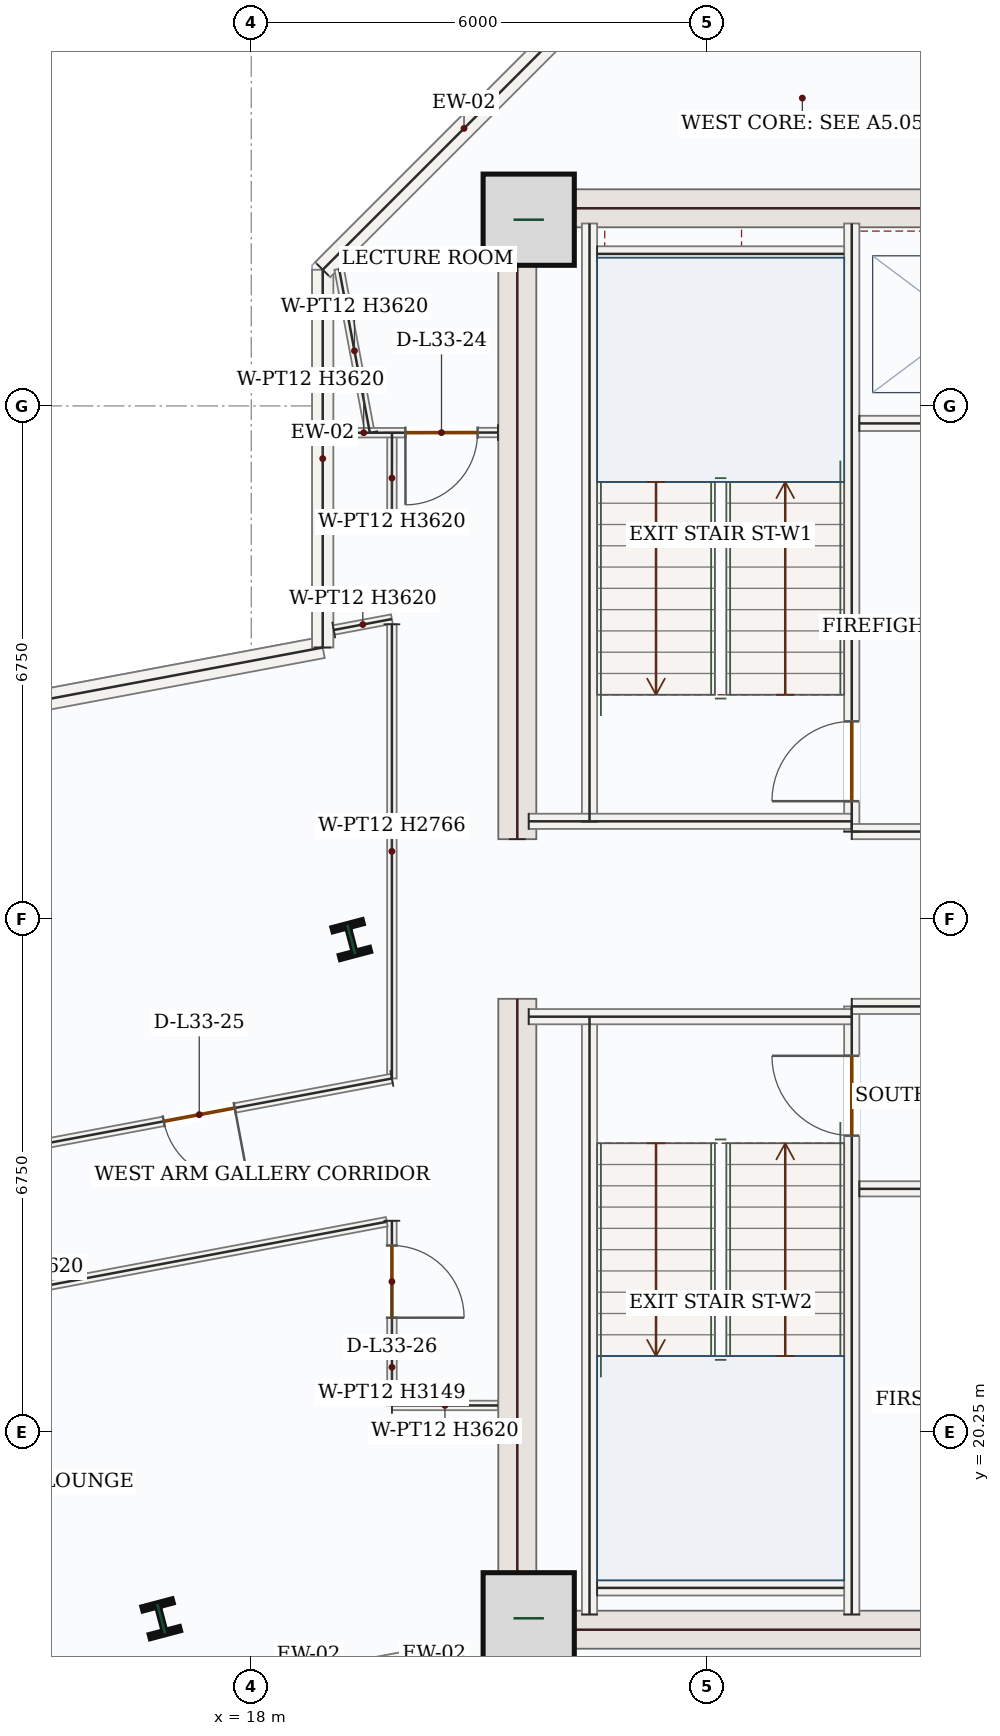
"""IFC4 building model, lengths in metres.
Left out: names, types, materials, properties, quantities, classifications, styles, units other than length and angle.
Written with IfcOpenShell. Run it as: python <this file> out.ifc"""

import sys

from ifc_helpers import new_model, si_unit, direction, frame, frame_2d, origin, origin_2d, place, context, subcontext, project, spatial, rectangle, i_section, extrude, source, transform, mapped, element, fill, save


model = new_model("IFC4")
c1 = context("Model", 3, precision=1e-05, world=origin(), true_north=direction((0.0, 1.0)))
c2 = subcontext(c1, "Body", "Model", "MODEL_VIEW")
j1 = project(units=[si_unit("LENGTHUNIT", "METRE"), si_unit("PLANEANGLEUNIT", "RADIAN")], contexts=[c1])
p1 = place(None, origin())
s1 = spatial("IfcSite", under=j1, at=p1, CompositionType="ELEMENT")
p2 = place(p1, origin())
s2 = spatial("IfcBuilding", under=s1, at=p2, CompositionType="ELEMENT")
p3 = place(p2, frame((0.0, 0.0, 147.3)))
s3 = spatial("IfcBuildingStorey", under=s2, at=p3, CompositionType="ELEMENT", Elevation=147.3)
m1 = source(origin(), c2, "Body", "SweptSolid", [
    extrude(rectangle(XDim=8.55, YDim=0.5, at=frame_2d((4.275, 0.0))), origin(), (0.0, 0.0, 1.0), 3.62),
])
for number, where, z_axis, x_axis in (
    (1, (21.5, 17.4, 0.0), (0.0, 0.0, 1.0), (0.0, 1.0, 0.0)),
    (2, (21.5, 28.05, 0.0), (0.0, 0.0, 1.0), (0.0, 1.0, 0.0)),
):
    element("IfcWall", number, at=place(p3, frame(where, z_axis=z_axis, x_axis=x_axis)), inside=s3, PredefinedType="SHEAR", context=c2, shape_type="MappedRepresentation", body=[
        mapped(m1, transform((0.0, 0.0, 0.0), x_axis=(1.0, 0.0, 0.0), y_axis=(0.0, 1.0, 0.0), z_axis=(0.0, 0.0, 1.0), scale=1.0)),
    ])
m2 = source(origin(), c2, "Body", "SweptSolid", [
    extrude(rectangle(XDim=7.0, YDim=0.5, at=frame_2d((3.5, 0.0))), origin(), (0.0, 0.0, 1.0), 3.62),
])
for number, where, z_axis, x_axis in (
    (3, (21.75, 17.65, 0.0), (0.0, 0.0, 1.0), (1.0, 0.0, 0.0)),
    (4, (21.75, 36.35, 0.0), (0.0, 0.0, 1.0), (1.0, 0.0, 0.0)),
):
    element("IfcWall", number, at=place(p3, frame(where, z_axis=z_axis, x_axis=x_axis)), inside=s3, PredefinedType="SHEAR", context=c2, shape_type="MappedRepresentation", body=[
        mapped(m2, transform((0.0, 0.0, 0.0), x_axis=(1.0, 0.0, 0.0), y_axis=(0.0, 1.0, 0.0), z_axis=(0.0, 0.0, 1.0), scale=1.0)),
    ])
m3 = source(origin(), c2, "Body", "SweptSolid", [
    extrude(rectangle(XDim=1.2, YDim=1.2, at=origin_2d()), origin(), (0.0, 0.0, 1.0), 3.9),
])
for number, where, z_axis, x_axis in (
    (5, (21.65, 17.8, 0.0), (0.0, 0.0, 1.0), (1.0, 0.0, 0.0)),
    (6, (21.65, 36.2, 0.0), (0.0, 0.0, 1.0), (1.0, 0.0, 0.0)),
):
    element("IfcColumn", number, at=place(p3, frame(where, z_axis=z_axis, x_axis=x_axis)), inside=s3, PredefinedType="COLUMN", context=c2, shape_type="MappedRepresentation", body=[
        mapped(m3, transform((0.0, 0.0, 0.0), x_axis=(1.0, 0.0, 0.0), y_axis=(0.0, 1.0, 0.0), z_axis=(0.0, 0.0, 1.0), scale=1.0)),
    ])
m4 = source(origin(), c2, "Body", "SweptSolid", [
    extrude(i_section(OverallWidth=0.412, OverallDepth=0.435, WebThickness=0.036, FlangeThickness=0.057, FilletRadius=0.018, at=origin_2d()), origin(), (0.0, 0.0, 1.0), 3.9),
])
for number, where, z_axis, x_axis in (
    (7, (19.316, 26.729, 0.0), (0.0, 0.0, 1.0), (0.967, 0.255, 0.0)),
    (8, (16.815, 17.794, 0.0), (0.0, 0.0, 1.0), (0.967, 0.255, 0.0)),
):
    element("IfcColumn", number, at=place(p3, frame(where, z_axis=z_axis, x_axis=x_axis)), inside=s3, PredefinedType="COLUMN", context=c2, shape_type="MappedRepresentation", body=[
        mapped(m4, transform((0.0, 0.0, 0.0), x_axis=(1.0, 0.0, 0.0), y_axis=(0.0, 1.0, 0.0), z_axis=(0.0, 0.0, 1.0), scale=1.0)),
    ])
p4 = place(p3, frame((22.658, 14.74, 0.0), z_axis=(0.0, 0.0, 1.0), x_axis=(-0.707106781187, 0.707106781187, 0.0)))
e9 = element("IfcWall", 9, at=p4, inside=s3, PredefinedType="SOLIDWALL", context=c2, shape_type="SweptSolid", body=[
    extrude(rectangle(XDim=3.544, YDim=0.28, at=frame_2d((1.772, 0.0))), origin(), (0.0, 0.0, 1.0), 3.62),
])
p5 = place(p4, frame((0.872, 0.0, 0.85)))
e10 = element("IfcOpeningElement", 10, at=p5, cuts=e9, PredefinedType="OPENING", context=c2, shape_type="SweptSolid", body=[
    extrude(rectangle(XDim=1.8, YDim=1.75, at=frame_2d((0.9, 0.875))), frame((0.0, 0.15, 0.0), z_axis=(0.0, -1.0, 0.0), x_axis=(1.0, 0.0, 0.0)), (0.0, 0.0, 1.0), 0.3),
])
p6 = place(p3, frame((20.152, 17.246, 0.0), z_axis=(0.0, 0.0, 1.0), x_axis=(-0.982809278234, -0.18462373254, 0.0)))
e11 = element("IfcWall", 11, at=p6, inside=s3, PredefinedType="SOLIDWALL", context=c2, shape_type="SweptSolid", body=[
    extrude(rectangle(XDim=7.783, YDim=0.28, at=frame_2d((3.892, 0.0))), origin(), (0.0, 0.0, 1.0), 3.62),
])
p7 = place(p6, frame((2.992, 0.0, 0.85)))
e12 = element("IfcOpeningElement", 12, at=p7, cuts=e11, PredefinedType="OPENING", context=c2, shape_type="SweptSolid", body=[
    extrude(rectangle(XDim=1.8, YDim=1.75, at=frame_2d((0.9, 0.875))), frame((0.0, 0.15, 0.0), z_axis=(0.0, -1.0, 0.0), x_axis=(1.0, 0.0, 0.0)), (0.0, 0.0, 1.0), 0.3),
])
m5 = source(origin(), c2, "Body", "SweptSolid", [
    extrude(rectangle(XDim=9.052, YDim=0.28, at=frame_2d((4.526, 0.0))), origin(), (0.0, 0.0, 1.0), 3.62),
])
p8 = place(p3, frame((10.043, 28.9, 0.0), z_axis=(0.0, 0.0, 1.0), x_axis=(0.982808012228, 0.184630471755, 0.0)))
e13 = element("IfcWall", 13, at=p8, inside=s3, PredefinedType="SOLIDWALL", context=c2, shape_type="MappedRepresentation", body=[
    mapped(m5, transform((0.0, 0.0, 0.0), x_axis=(1.0, 0.0, 0.0), y_axis=(0.0, 1.0, 0.0), z_axis=(0.0, 0.0, 1.0), scale=1.0)),
])
m6 = source(origin(), c2, "Body", "SweptSolid", [
    extrude(rectangle(XDim=4.97, YDim=0.28, at=frame_2d((2.485, 0.0))), origin(), (0.0, 0.0, 1.0), 3.62),
])
p9 = place(p3, frame((18.94, 30.572, 0.0), z_axis=(0.0, 0.0, 1.0), x_axis=(0.0, 1.0, 0.0)))
e14 = element("IfcWall", 14, at=p9, inside=s3, PredefinedType="SOLIDWALL", context=c2, shape_type="MappedRepresentation", body=[
    mapped(m6, transform((0.0, 0.0, 0.0), x_axis=(1.0, 0.0, 0.0), y_axis=(0.0, 1.0, 0.0), z_axis=(0.0, 0.0, 1.0), scale=1.0)),
])
m7 = source(origin(), c2, "Body", "SweptSolid", [
    extrude(rectangle(XDim=5.258, YDim=0.28, at=frame_2d((2.629, 0.0))), origin(), (0.0, 0.0, 1.0), 3.62),
])
p10 = place(p3, frame((18.94, 35.542, 0.0), z_axis=(0.0, 0.0, 1.0), x_axis=(0.707106781187, 0.707106781187, 0.0)))
e15 = element("IfcWall", 15, at=p10, inside=s3, PredefinedType="SOLIDWALL", context=c2, shape_type="MappedRepresentation", body=[
    mapped(m7, transform((0.0, 0.0, 0.0), x_axis=(1.0, 0.0, 0.0), y_axis=(0.0, 1.0, 0.0), z_axis=(0.0, 0.0, 1.0), scale=1.0)),
])
m8 = source(origin(), c2, "Body", "SweptSolid", [
    extrude(rectangle(XDim=7.87, YDim=0.2, at=frame_2d((3.935, 0.0))), origin(), (0.0, 0.0, 1.0), 3.62),
])
for number, where, z_axis, x_axis in (
    (16, (22.45, 17.85, 0.0), (0.0, 0.0, 1.0), (0.0, 1.0, 0.0)),
    (17, (22.45, 28.28, 0.0), (0.0, 0.0, 1.0), (0.0, 1.0, 0.0)),
):
    element("IfcWall", number, at=place(p3, frame(where, z_axis=z_axis, x_axis=x_axis)), inside=s3, PredefinedType="SOLIDWALL", context=c2, shape_type="MappedRepresentation", body=[
        mapped(m8, transform((0.0, 0.0, 0.0), x_axis=(1.0, 0.0, 0.0), y_axis=(0.0, 1.0, 0.0), z_axis=(0.0, 0.0, 1.0), scale=1.0)),
    ])
p11 = place(p3, frame((25.9, 17.85, 0.0), z_axis=(0.0, 0.0, 1.0), x_axis=(0.0, 1.0, 0.0)))
e18 = element("IfcWall", 18, at=p11, inside=s3, PredefinedType="SOLIDWALL", context=c2, shape_type="SweptSolid", body=[
    extrude(rectangle(XDim=8.0, YDim=0.2, at=frame_2d((4.0, 0.0))), origin(), (0.0, 0.0, 1.0), 3.62),
])
p12 = place(p11, frame((6.3, 0.0, 0.0)))
e19 = element("IfcOpeningElement", 19, at=p12, cuts=e18, PredefinedType="OPENING", context=c2, shape_type="SweptSolid", body=[
    extrude(rectangle(XDim=1.05, YDim=2.15, at=frame_2d((0.525, 1.075))), frame((0.0, 0.11, 0.0), z_axis=(0.0, -1.0, 0.0), x_axis=(1.0, 0.0, 0.0)), (0.0, 0.0, 1.0), 0.22),
])
p13 = place(p3, frame((25.9, 28.15, 0.0), z_axis=(0.0, 0.0, 1.0), x_axis=(0.0, 1.0, 0.0)))
e20 = element("IfcWall", 20, at=p13, inside=s3, PredefinedType="SOLIDWALL", context=c2, shape_type="SweptSolid", body=[
    extrude(rectangle(XDim=8.0, YDim=0.2, at=frame_2d((4.0, 0.0))), origin(), (0.0, 0.0, 1.0), 3.62),
])
p14 = place(p13, frame((0.4, 0.0, 0.0)))
e21 = element("IfcOpeningElement", 21, at=p14, cuts=e20, PredefinedType="OPENING", context=c2, shape_type="SweptSolid", body=[
    extrude(rectangle(XDim=1.05, YDim=2.15, at=frame_2d((0.525, 1.075))), frame((0.0, 0.11, 0.0), z_axis=(0.0, -1.0, 0.0), x_axis=(1.0, 0.0, 0.0)), (0.0, 0.0, 1.0), 0.22),
])
m9 = source(origin(), c2, "Body", "SweptSolid", [
    extrude(rectangle(XDim=4.25, YDim=0.2, at=frame_2d((2.125, 0.0))), origin(), (0.0, 0.0, 1.0), 3.62),
])
p15 = place(p3, frame((21.65, 25.715, 0.0), z_axis=(0.0, 0.0, 1.0), x_axis=(1.0, 0.0, 0.0)))
e22 = element("IfcWall", 22, at=p15, inside=s3, PredefinedType="SOLIDWALL", context=c2, shape_type="MappedRepresentation", body=[
    mapped(m9, transform((0.0, 0.0, 0.0), x_axis=(1.0, 0.0, 0.0), y_axis=(0.0, 1.0, 0.0), z_axis=(0.0, 0.0, 1.0), scale=1.0)),
])
m10 = source(origin(), c2, "Body", "SweptSolid", [
    extrude(rectangle(XDim=3.0, YDim=0.2, at=frame_2d((1.5, 0.0))), origin(), (0.0, 0.0, 1.0), 3.62),
])
p16 = place(p3, frame((25.9, 25.85, 0.0), z_axis=(0.0, 0.0, 1.0), x_axis=(1.0, 0.0, 0.0)))
e23 = element("IfcWall", 23, at=p16, inside=s3, PredefinedType="SOLIDWALL", context=c2, shape_type="MappedRepresentation", body=[
    mapped(m10, transform((0.0, 0.0, 0.0), x_axis=(1.0, 0.0, 0.0), y_axis=(0.0, 1.0, 0.0), z_axis=(0.0, 0.0, 1.0), scale=1.0)),
])
p17 = place(p3, frame((21.65, 28.285, 0.0), z_axis=(0.0, 0.0, 1.0), x_axis=(1.0, 0.0, 0.0)))
e24 = element("IfcWall", 24, at=p17, inside=s3, PredefinedType="SOLIDWALL", context=c2, shape_type="MappedRepresentation", body=[
    mapped(m9, transform((0.0, 0.0, 0.0), x_axis=(1.0, 0.0, 0.0), y_axis=(0.0, 1.0, 0.0), z_axis=(0.0, 0.0, 1.0), scale=1.0)),
])
p18 = place(p3, frame((25.9, 28.15, 0.0), z_axis=(0.0, 0.0, 1.0), x_axis=(1.0, 0.0, 0.0)))
e25 = element("IfcWall", 25, at=p18, inside=s3, PredefinedType="SOLIDWALL", context=c2, shape_type="MappedRepresentation", body=[
    mapped(m10, transform((0.0, 0.0, 0.0), x_axis=(1.0, 0.0, 0.0), y_axis=(0.0, 1.0, 0.0), z_axis=(0.0, 0.0, 1.0), scale=1.0)),
])
m11 = source(origin(), c2, "Body", "SweptSolid", [
    extrude(rectangle(XDim=3.25, YDim=0.2, at=frame_2d((1.625, 0.0))), origin(), (0.0, 0.0, 1.0), 3.62),
])
for number, where, z_axis, x_axis in (
    (26, (22.55, 35.75, 0.0), (0.0, 0.0, 1.0), (1.0, 0.0, 0.0)),
    (27, (22.55, 18.2, 0.0), (0.0, 0.0, 1.0), (1.0, 0.0, 0.0)),
):
    element("IfcWall", number, at=place(p3, frame(where, z_axis=z_axis, x_axis=x_axis)), inside=s3, PredefinedType="SOLIDWALL", context=c2, shape_type="MappedRepresentation", body=[
        mapped(m11, transform((0.0, 0.0, 0.0), x_axis=(1.0, 0.0, 0.0), y_axis=(0.0, 1.0, 0.0), z_axis=(0.0, 0.0, 1.0), scale=1.0)),
    ])
p19 = place(p3, frame((26.0, 33.52, 0.0), z_axis=(0.0, 0.0, 1.0), x_axis=(1.0, 0.0, 0.0)))
e28 = element("IfcWall", 28, at=p19, inside=s3, PredefinedType="SOLIDWALL", context=c2, shape_type="SweptSolid", body=[
    extrude(rectangle(XDim=2.75, YDim=0.2, at=frame_2d((1.375, 0.0))), origin(), (0.0, 0.0, 1.0), 3.62),
])
p20 = place(p19, frame((0.82, 0.0, 0.0)))
e29 = element("IfcOpeningElement", 29, at=p20, cuts=e28, PredefinedType="OPENING", context=c2, shape_type="SweptSolid", body=[
    extrude(rectangle(XDim=1.1, YDim=2.15, at=frame_2d((0.55, 1.075))), frame((0.0, 0.11, 0.0), z_axis=(0.0, -1.0, 0.0), x_axis=(1.0, 0.0, 0.0)), (0.0, 0.0, 1.0), 0.22),
])
m12 = source(origin(), c2, "Body", "SweptSolid", [
    extrude(rectangle(XDim=2.75, YDim=0.2, at=frame_2d((1.375, 0.0))), origin(), (0.0, 0.0, 1.0), 3.62),
])
p21 = place(p3, frame((26.0, 23.45, 0.0), z_axis=(0.0, 0.0, 1.0), x_axis=(1.0, 0.0, 0.0)))
e30 = element("IfcWall", 30, at=p21, inside=s3, PredefinedType="SOLIDWALL", context=c2, shape_type="MappedRepresentation", body=[
    mapped(m12, transform((0.0, 0.0, 0.0), x_axis=(1.0, 0.0, 0.0), y_axis=(0.0, 1.0, 0.0), z_axis=(0.0, 0.0, 1.0), scale=1.0)),
])
m13 = source(origin(), c2, "Body", "SweptSolid", [
    extrude(rectangle(XDim=1.195, YDim=0.125, at=frame_2d((0.597, 0.0))), origin(), (0.0, 0.0, 1.0), 3.62),
])
p22 = place(p3, frame((19.851, 33.398, 0.0), z_axis=(0.0, 0.0, 1.0), x_axis=(-0.001021867441, -0.999999477893, 0.0)))
e31 = element("IfcWall", 31, at=p22, inside=s3, PredefinedType="PARTITIONING", context=c2, shape_type="MappedRepresentation", body=[
    mapped(m13, transform((0.0, 0.0, 0.0), x_axis=(1.0, 0.0, 0.0), y_axis=(0.0, 1.0, 0.0), z_axis=(0.0, 0.0, 1.0), scale=1.0)),
])
m14 = source(origin(), c2, "Body", "SweptSolid", [
    extrude(rectangle(XDim=2.192, YDim=0.125, at=frame_2d((1.096, 0.0))), origin(), (0.0, 0.0, 1.0), 3.62),
])
p23 = place(p3, frame((19.56, 33.398, 0.0), z_axis=(0.0, 0.0, 1.0), x_axis=(-0.184665106031, 0.982801505196, 0.0)))
e32 = element("IfcWall", 32, at=p23, inside=s3, PredefinedType="PARTITIONING", context=c2, shape_type="MappedRepresentation", body=[
    mapped(m14, transform((0.0, 0.0, 0.0), x_axis=(1.0, 0.0, 0.0), y_axis=(0.0, 1.0, 0.0), z_axis=(0.0, 0.0, 1.0), scale=1.0)),
])
p24 = place(p3, frame((21.245, 33.4, 0.0), z_axis=(0.0, 0.0, 1.0), x_axis=(-0.99999875384, -0.001578708001, 0.0)))
e33 = element("IfcWall", 33, at=p24, inside=s3, PredefinedType="PARTITIONING", context=c2, shape_type="SweptSolid", body=[
    extrude(rectangle(XDim=2.165, YDim=0.125, at=frame_2d((1.083, 0.0))), origin(), (0.0, 0.0, 1.0), 3.62),
])
p25 = place(p24, frame((0.267, 0.0, 0.0)))
e34 = element("IfcOpeningElement", 34, at=p25, cuts=e33, PredefinedType="OPENING", context=c2, shape_type="SweptSolid", body=[
    extrude(rectangle(XDim=0.95, YDim=2.15, at=frame_2d((0.475, 1.075))), frame((0.0, 0.073, 0.0), z_axis=(0.0, -1.0, 0.0), x_axis=(1.0, 0.0, 0.0)), (0.0, 0.0, 1.0), 0.145),
])
m15 = source(origin(), c2, "Body", "SweptSolid", [
    extrude(rectangle(XDim=0.779, YDim=0.125, at=frame_2d((0.389, 0.0))), origin(), (0.0, 0.0, 1.0), 3.62),
])
p26 = place(p3, frame((19.085, 30.802, 0.0), z_axis=(0.0, 0.0, 1.0), x_axis=(0.982850878619, 0.184402143149, 0.0)))
e35 = element("IfcWall", 35, at=p26, inside=s3, PredefinedType="PARTITIONING", context=c2, shape_type="MappedRepresentation", body=[
    mapped(m15, transform((0.0, 0.0, 0.0), x_axis=(1.0, 0.0, 0.0), y_axis=(0.0, 1.0, 0.0), z_axis=(0.0, 0.0, 1.0), scale=1.0)),
])
m16 = source(origin(), c2, "Body", "SweptSolid", [
    extrude(rectangle(XDim=5.975, YDim=0.125, at=frame_2d((2.988, 0.0))), origin(), (0.0, 0.0, 1.0), 2.766),
])
p27 = place(p3, frame((19.85, 30.877, 0.0), z_axis=(0.0, 0.0, 1.0), x_axis=(0.0, -1.0, 0.0)))
e36 = element("IfcWall", 36, at=p27, inside=s3, PredefinedType="PARTITIONING", context=c2, shape_type="MappedRepresentation", body=[
    mapped(m16, transform((0.0, 0.0, 0.0), x_axis=(1.0, 0.0, 0.0), y_axis=(0.0, 1.0, 0.0), z_axis=(0.0, 0.0, 1.0), scale=1.0)),
])
p28 = place(p3, frame((19.85, 24.902, 0.0), z_axis=(0.0, 0.0, 1.0), x_axis=(-0.982804817995, -0.184647474194, 0.0)))
e37 = element("IfcWall", 37, at=p28, inside=s3, PredefinedType="PARTITIONING", context=c2, shape_type="SweptSolid", body=[
    extrude(rectangle(XDim=10.513, YDim=0.125, at=frame_2d((5.256, 0.0))), origin(), (0.0, 0.0, 1.0), 3.62),
])
p29 = place(p28, frame((2.104, 0.0, 0.0)))
e38 = element("IfcOpeningElement", 38, at=p29, cuts=e37, PredefinedType="OPENING", context=c2, shape_type="SweptSolid", body=[
    extrude(rectangle(XDim=0.95, YDim=2.15, at=frame_2d((0.475, 1.075))), frame((0.0, 0.073, 0.0), z_axis=(0.0, -1.0, 0.0), x_axis=(1.0, 0.0, 0.0)), (0.0, 0.0, 1.0), 0.145),
])
p30 = place(p3, frame((19.85, 23.03, 0.0), z_axis=(0.0, 0.0, 1.0), x_axis=(0.00040209084, -0.999999919161, 0.0)))
e39 = element("IfcWall", 39, at=p30, inside=s3, PredefinedType="PARTITIONING", context=c2, shape_type="SweptSolid", body=[
    extrude(rectangle(XDim=2.429, YDim=0.125, at=frame_2d((1.214, 0.0))), origin(), (0.0, 0.0, 1.0), 3.149),
])
p31 = place(p30, frame((0.325, 0.0, 0.0)))
e40 = element("IfcOpeningElement", 40, at=p31, cuts=e39, PredefinedType="OPENING", context=c2, shape_type="SweptSolid", body=[
    extrude(rectangle(XDim=0.95, YDim=2.15, at=frame_2d((0.475, 1.075))), frame((0.0, 0.073, 0.0), z_axis=(0.0, -1.0, 0.0), x_axis=(1.0, 0.0, 0.0)), (0.0, 0.0, 1.0), 0.145),
])
m17 = source(origin(), c2, "Body", "SweptSolid", [
    extrude(rectangle(XDim=1.394, YDim=0.125, at=frame_2d((0.697, 0.0))), origin(), (0.0, 0.0, 1.0), 3.62),
])
p32 = place(p3, frame((19.851, 20.601, 0.0), z_axis=(0.0, 0.0, 1.0), x_axis=(0.999999754632, -0.000700525222, 0.0)))
e41 = element("IfcWall", 41, at=p32, inside=s3, PredefinedType="PARTITIONING", context=c2, shape_type="MappedRepresentation", body=[
    mapped(m17, transform((0.0, 0.0, 0.0), x_axis=(1.0, 0.0, 0.0), y_axis=(0.0, 1.0, 0.0), z_axis=(0.0, 0.0, 1.0), scale=1.0)),
])
m18 = source(origin(), c2, "Body", "SweptSolid", [
    extrude(rectangle(XDim=10.098, YDim=0.125, at=frame_2d((5.049, 0.0))), origin(), (0.0, 0.0, 1.0), 3.62),
])
p33 = place(p3, frame((9.858, 21.153, 0.0), z_axis=(0.0, 0.0, 1.0), x_axis=(0.982807535277, 0.1846330106, 0.0)))
e42 = element("IfcWall", 42, at=p33, inside=s3, PredefinedType="PARTITIONING", context=c2, shape_type="MappedRepresentation", body=[
    mapped(m18, transform((0.0, 0.0, 0.0), x_axis=(1.0, 0.0, 0.0), y_axis=(0.0, 1.0, 0.0), z_axis=(0.0, 0.0, 1.0), scale=1.0)),
])
m19 = source(origin(), c2, "Body", "SweptSolid", [
    extrude(rectangle(XDim=1.05, YDim=2.15, at=frame_2d((0.525, 1.075))), frame((0.0, 0.025, 0.0), z_axis=(0.0, -1.0, 0.0), x_axis=(1.0, 0.0, 0.0)), (0.0, 0.0, 1.0), 0.05),
])
p34 = place(p14, origin())
e43 = element("IfcDoor", 43, at=p34, inside=s3, OperationType="SINGLE_SWING_LEFT", PredefinedType="DOOR", context=c2, shape_type="MappedRepresentation", body=[
    mapped(m19, transform((0.0, 0.0, 0.0), x_axis=(1.0, 0.0, 0.0), y_axis=(0.0, 1.0, 0.0), z_axis=(0.0, 0.0, 1.0), scale=1.0)),
])
fill(e21, e43)
p35 = place(p12, origin())
e44 = element("IfcDoor", 44, at=p35, inside=s3, OperationType="SINGLE_SWING_RIGHT", PredefinedType="DOOR", context=c2, shape_type="MappedRepresentation", body=[
    mapped(m19, transform((0.0, 0.0, 0.0), x_axis=(1.0, 0.0, 0.0), y_axis=(0.0, 1.0, 0.0), z_axis=(0.0, 0.0, 1.0), scale=1.0)),
])
fill(e19, e44)
m20 = source(origin(), c2, "Body", "SweptSolid", [
    extrude(rectangle(XDim=0.95, YDim=2.15, at=frame_2d((0.475, 1.075))), frame((0.0, 0.025, 0.0), z_axis=(0.0, -1.0, 0.0), x_axis=(1.0, 0.0, 0.0)), (0.0, 0.0, 1.0), 0.05),
])
p36 = place(p25, origin())
e45 = element("IfcDoor", 45, at=p36, inside=s3, OperationType="SINGLE_SWING_RIGHT", PredefinedType="DOOR", context=c2, shape_type="MappedRepresentation", body=[
    mapped(m20, transform((0.0, 0.0, 0.0), x_axis=(1.0, 0.0, 0.0), y_axis=(0.0, 1.0, 0.0), z_axis=(0.0, 0.0, 1.0), scale=1.0)),
])
fill(e34, e45)
p37 = place(p29, origin())
e46 = element("IfcDoor", 46, at=p37, inside=s3, OperationType="SINGLE_SWING_LEFT", PredefinedType="DOOR", context=c2, shape_type="MappedRepresentation", body=[
    mapped(m20, transform((0.0, 0.0, 0.0), x_axis=(1.0, 0.0, 0.0), y_axis=(0.0, 1.0, 0.0), z_axis=(0.0, 0.0, 1.0), scale=1.0)),
])
fill(e38, e46)
p38 = place(p31, origin())
e47 = element("IfcDoor", 47, at=p38, inside=s3, OperationType="SINGLE_SWING_RIGHT", PredefinedType="DOOR", context=c2, shape_type="MappedRepresentation", body=[
    mapped(m20, transform((0.0, 0.0, 0.0), x_axis=(1.0, 0.0, 0.0), y_axis=(0.0, 1.0, 0.0), z_axis=(0.0, 0.0, 1.0), scale=1.0)),
])
fill(e40, e47)
save(model, sys.argv[1])
